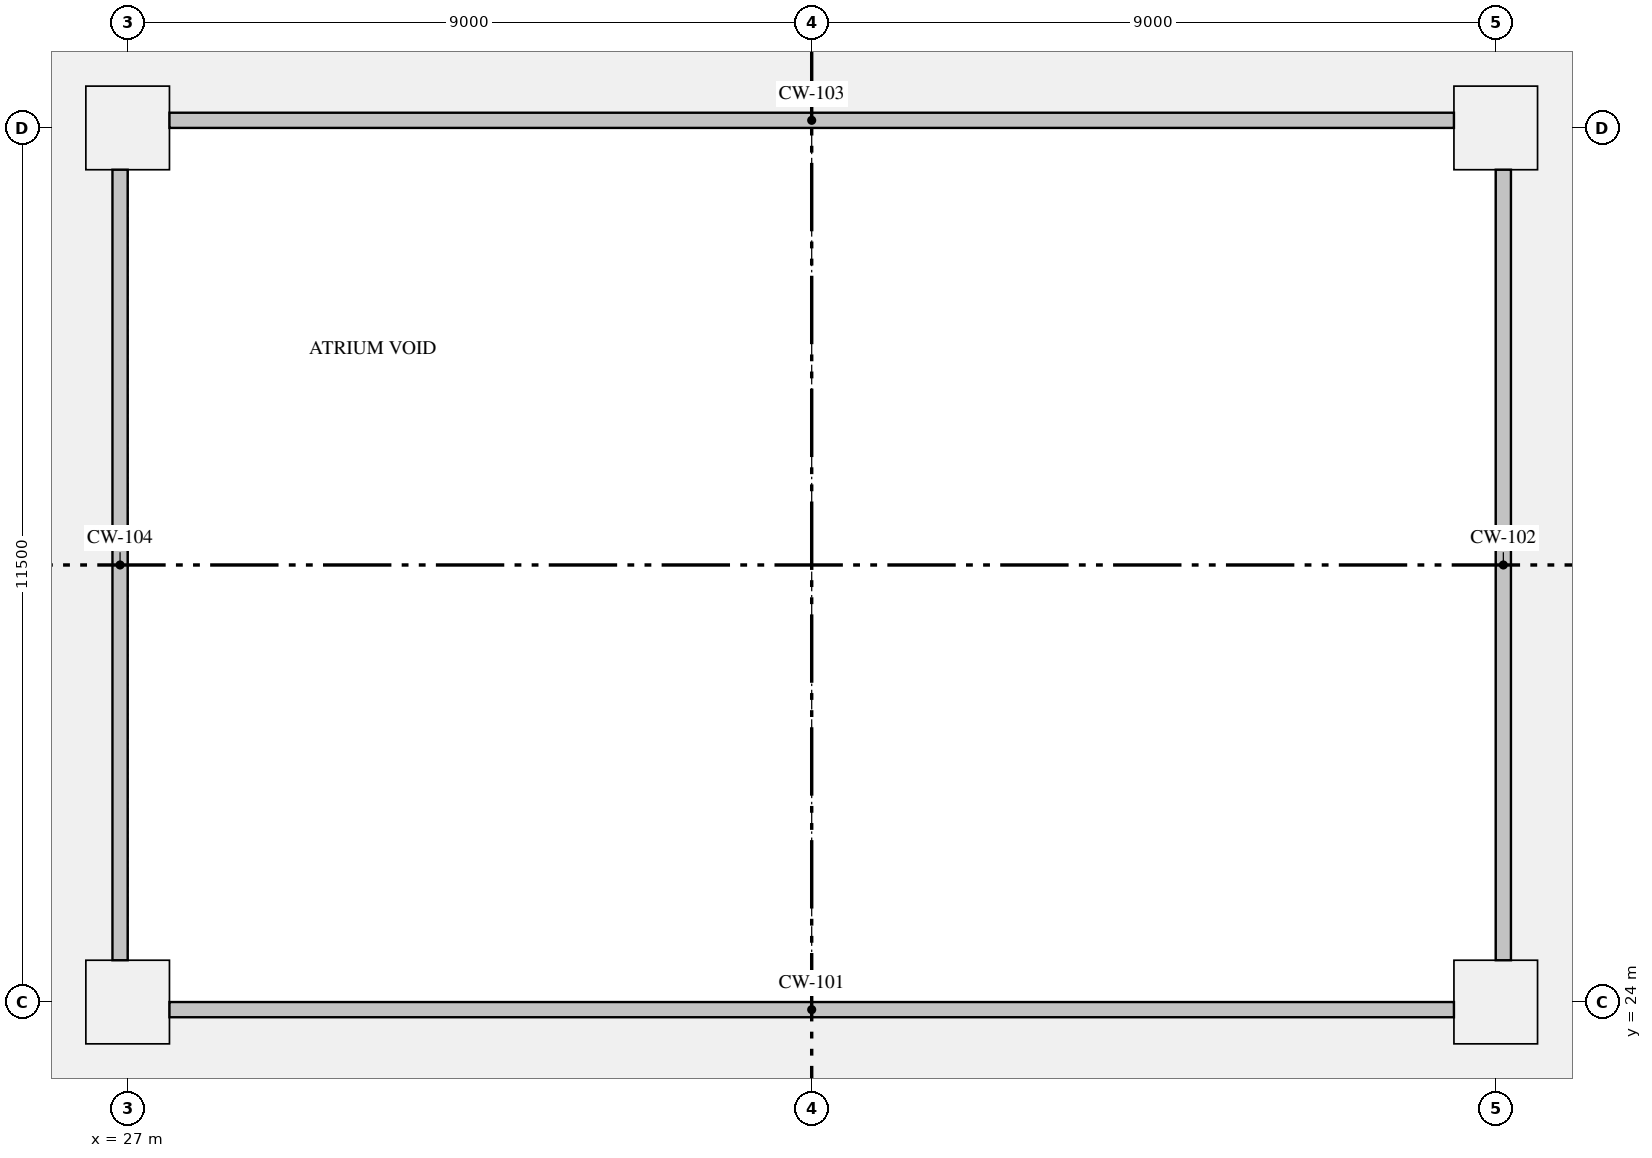
"""IFC4 building model, lengths in metres.
Left out: names, types, materials, properties, quantities, classifications, styles, units other than length and angle.
Written with IfcOpenShell. Run it as: python <this file> out.ifc"""

import sys

from ifc_helpers import new_model, si_unit, direction, frame, origin, origin_2d, place, context, subcontext, project, spatial, rectangle, extrude, element, save


model = new_model("IFC4")
c1 = context("Model", 3, precision=1e-05, world=origin(), true_north=direction((0.0, 1.0)))
c2 = subcontext(c1, "Body", "Model", "MODEL_VIEW")
j1 = project(units=[si_unit("LENGTHUNIT", "METRE"), si_unit("PLANEANGLEUNIT", "RADIAN")], contexts=[c1])
p1 = place(None, origin())
s1 = spatial("IfcSite", under=j1, at=p1, CompositionType="ELEMENT")
p2 = place(p1, origin())
s2 = spatial("IfcBuilding", under=s1, at=p2, CompositionType="ELEMENT")
p3 = place(p2, frame((0.0, 0.0, 185.4)))
s3 = spatial("IfcBuildingStorey", under=s2, at=p3, CompositionType="ELEMENT", Elevation=185.4)
for number, where, z_axis, x_axis in (
    (1, (27.0, 24.0, 0.0), (0.0, 0.0, 1.0), (1.0, 0.0, 0.0)),
    (2, (45.0, 24.0, 0.0), (0.0, 0.0, 1.0), (1.0, 0.0, 0.0)),
    (3, (27.0, 35.5, 0.0), (0.0, 0.0, 1.0), (1.0, 0.0, 0.0)),
    (4, (45.0, 35.5, 0.0), (0.0, 0.0, 1.0), (1.0, 0.0, 0.0)),
):
    element("IfcColumn", number, at=place(p3, frame(where, z_axis=z_axis, x_axis=x_axis)), inside=s3, PredefinedType="COLUMN", context=c2, shape_type="SweptSolid", body=[
        extrude(rectangle(XDim=1.1, YDim=1.1, at=origin_2d()), origin(), (0.0, 0.0, 1.0), 6.3),
    ])
save(model, sys.argv[1])
